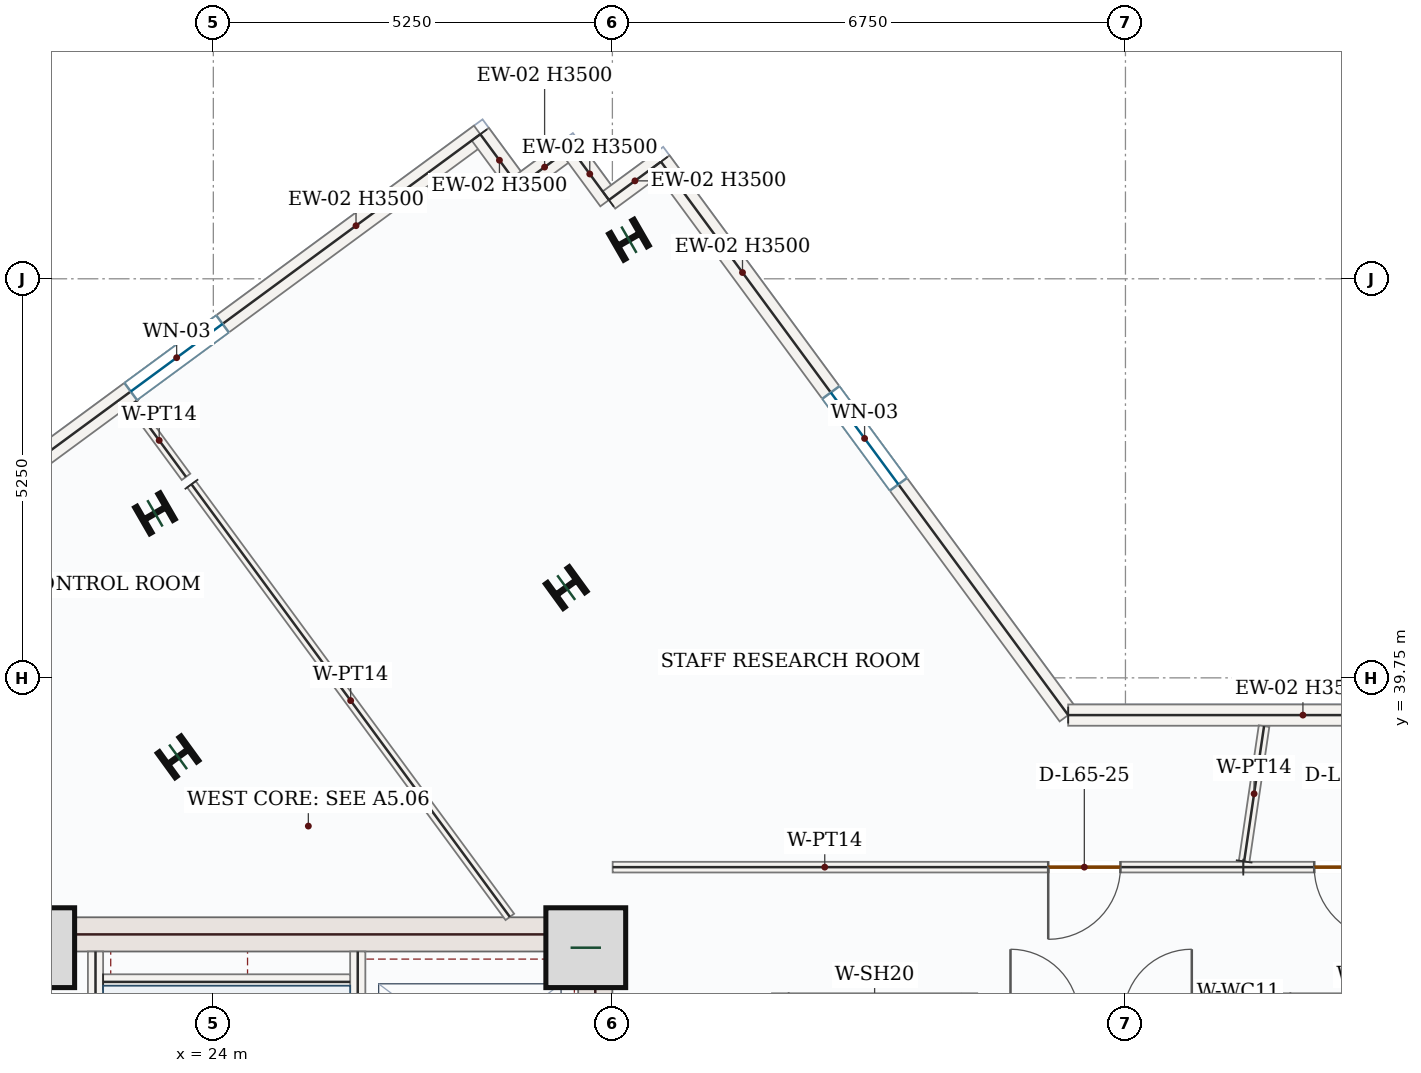
"""IFC4 building model, lengths in metres.
Left out: names, types, materials, properties, quantities, classifications, styles, units other than length and angle.
Written with IfcOpenShell. Run it as: python <this file> out.ifc"""

import sys

from ifc_helpers import new_model, si_unit, direction, frame, frame_2d, origin, origin_2d, place, context, subcontext, project, spatial, rectangle, i_section, extrude, source, transform, mapped, element, fill, save


model = new_model("IFC4")
c1 = context("Model", 3, precision=1e-05, world=origin(), true_north=direction((0.0, 1.0)))
c2 = subcontext(c1, "Body", "Model", "MODEL_VIEW")
j1 = project(units=[si_unit("LENGTHUNIT", "METRE"), si_unit("PLANEANGLEUNIT", "RADIAN")], contexts=[c1])
p1 = place(None, origin())
s1 = spatial("IfcSite", under=j1, at=p1, CompositionType="ELEMENT")
p2 = place(p1, origin())
s2 = spatial("IfcBuilding", under=s1, at=p2, CompositionType="ELEMENT")
p3 = place(p2, frame((0.0, 0.0, 272.85)))
s3 = spatial("IfcBuildingStorey", under=s2, at=p3, CompositionType="ELEMENT", Elevation=272.85)
p4 = place(p3, frame((29.025, 28.05, 0.0), z_axis=(0.0, 0.0, 1.0), x_axis=(0.0, 1.0, 0.0)))
e1 = element("IfcWall", 1, at=p4, inside=s3, PredefinedType="SHEAR", context=c2, shape_type="SweptSolid", body=[
    extrude(rectangle(XDim=8.55, YDim=0.45, at=frame_2d((4.275, 0.0))), origin(), (0.0, 0.0, 1.0), 3.5),
])
p5 = place(p4, frame((1.5, 0.0, 0.0)))
e2 = element("IfcOpeningElement", 2, at=p5, cuts=e1, PredefinedType="OPENING", context=c2, shape_type="SweptSolid", body=[
    extrude(rectangle(XDim=1.1, YDim=2.2, at=frame_2d((0.55, 1.1))), frame((0.0, 0.235, 0.0), z_axis=(0.0, -1.0, 0.0), x_axis=(1.0, 0.0, 0.0)), (0.0, 0.0, 1.0), 0.47),
])
m1 = source(origin(), c2, "Body", "SweptSolid", [
    extrude(rectangle(XDim=7.1, YDim=0.45, at=frame_2d((3.55, 0.0))), origin(), (0.0, 0.0, 1.0), 3.5),
])
p6 = place(p3, frame((21.7, 36.375, 0.0), z_axis=(0.0, 0.0, 1.0), x_axis=(1.0, 0.0, 0.0)))
e3 = element("IfcWall", 3, at=p6, inside=s3, PredefinedType="SHEAR", context=c2, shape_type="MappedRepresentation", body=[
    mapped(m1, transform((0.0, 0.0, 0.0), x_axis=(1.0, 0.0, 0.0), y_axis=(0.0, 1.0, 0.0), z_axis=(0.0, 0.0, 1.0), scale=1.0)),
])
m2 = source(origin(), c2, "Body", "SweptSolid", [
    extrude(rectangle(XDim=1.05, YDim=1.05, at=origin_2d()), origin(), (0.0, 0.0, 1.0), 3.75),
])
for number, where, z_axis, x_axis in (
    (4, (21.65, 36.2, 0.0), (0.0, 0.0, 1.0), (1.0, 0.0, 0.0)),
    (5, (28.9, 36.2, 0.0), (0.0, 0.0, 1.0), (1.0, 0.0, 0.0)),
):
    element("IfcColumn", number, at=place(p3, frame(where, z_axis=z_axis, x_axis=x_axis)), inside=s3, PredefinedType="COLUMN", context=c2, shape_type="MappedRepresentation", body=[
        mapped(m2, transform((0.0, 0.0, 0.0), x_axis=(1.0, 0.0, 0.0), y_axis=(0.0, 1.0, 0.0), z_axis=(0.0, 0.0, 1.0), scale=1.0)),
    ])
m3 = source(origin(), c2, "Body", "SweptSolid", [
    extrude(i_section(OverallWidth=0.399, OverallDepth=0.386, WebThickness=0.021, FlangeThickness=0.033, FilletRadius=0.018, at=origin_2d()), origin(), (0.0, 0.0, 1.0), 3.75),
])
for number, where, z_axis, x_axis in (
    (6, (28.643, 40.937, 0.0), (0.0, 0.0, 1.0), (-0.588, 0.809, 0.0)),
    (7, (23.536, 38.711, 0.0), (0.0, 0.0, 1.0), (-0.588, 0.809, 0.0)),
    (8, (29.468, 45.514, 0.0), (0.0, 0.0, 1.0), (-0.5, 0.866, 0.0)),
    (9, (23.232, 41.914, 0.0), (0.0, 0.0, 1.0), (-0.5, 0.866, 0.0)),
):
    element("IfcColumn", number, at=place(p3, frame(where, z_axis=z_axis, x_axis=x_axis)), inside=s3, PredefinedType="COLUMN", context=c2, shape_type="MappedRepresentation", body=[
        mapped(m3, transform((0.0, 0.0, 0.0), x_axis=(1.0, 0.0, 0.0), y_axis=(0.0, 1.0, 0.0), z_axis=(0.0, 0.0, 1.0), scale=1.0)),
    ])
p7 = place(p3, frame((19.522, 41.022, 0.0), z_axis=(0.0, 0.0, 1.0), x_axis=(0.805418797839, 0.592706132994, 0.0)))
e10 = element("IfcWall", 10, at=p7, inside=s3, PredefinedType="SOLIDWALL", context=c2, shape_type="SweptSolid", body=[
    extrude(rectangle(XDim=9.92, YDim=0.28, at=frame_2d((4.96, 0.0))), origin(), (0.0, 0.0, 1.0), 3.5),
])
p8 = place(p7, frame((4.21, 0.0, 0.85)))
e11 = element("IfcOpeningElement", 11, at=p8, cuts=e10, PredefinedType="OPENING", context=c2, shape_type="SweptSolid", body=[
    extrude(rectangle(XDim=1.5, YDim=1.5, at=frame_2d((0.75, 0.75))), frame((0.0, 0.15, 0.0), z_axis=(0.0, -1.0, 0.0), x_axis=(1.0, 0.0, 0.0)), (0.0, 0.0, 1.0), 0.3),
])
m4 = source(origin(), c2, "Body", "SweptSolid", [
    extrude(rectangle(XDim=0.85, YDim=0.28, at=frame_2d((0.425, 0.0))), origin(), (0.0, 0.0, 1.0), 3.5),
])
for number, where, z_axis, x_axis in (
    (12, (27.512, 46.902, 0.0), (0.0, 0.0, 1.0), (0.593, -0.805, 0.0)),
    (13, (28.016, 46.217, 0.0), (0.0, 0.0, 1.0), (0.805, 0.593, 0.0)),
):
    element("IfcWall", number, at=place(p3, frame(where, z_axis=z_axis, x_axis=x_axis)), inside=s3, PredefinedType="SOLIDWALL", context=c2, shape_type="MappedRepresentation", body=[
        mapped(m4, transform((0.0, 0.0, 0.0), x_axis=(1.0, 0.0, 0.0), y_axis=(0.0, 1.0, 0.0), z_axis=(0.0, 0.0, 1.0), scale=1.0)),
    ])
m5 = source(origin(), c2, "Body", "SweptSolid", [
    extrude(rectangle(XDim=0.85, YDim=0.28, at=frame_2d((0.425, 0.0))), origin(), (0.0, 0.0, 1.0), 3.5),
])
for number, where, z_axis, x_axis in (
    (14, (28.701, 46.721, 0.0), (0.0, 0.0, 1.0), (0.593, -0.805, 0.0)),
    (15, (29.204, 46.037, 0.0), (0.0, 0.0, 1.0), (0.805, 0.593, 0.0)),
):
    element("IfcWall", number, at=place(p3, frame(where, z_axis=z_axis, x_axis=x_axis)), inside=s3, PredefinedType="SOLIDWALL", context=c2, shape_type="MappedRepresentation", body=[
        mapped(m5, transform((0.0, 0.0, 0.0), x_axis=(1.0, 0.0, 0.0), y_axis=(0.0, 1.0, 0.0), z_axis=(0.0, 0.0, 1.0), scale=1.0)),
    ])
p9 = place(p3, frame((29.889, 46.54, 0.0), z_axis=(0.0, 0.0, 1.0), x_axis=(0.592715239748, -0.805412096117, 0.0)))
e16 = element("IfcWall", 16, at=p9, inside=s3, PredefinedType="SOLIDWALL", context=c2, shape_type="SweptSolid", body=[
    extrude(rectangle(XDim=9.039, YDim=0.28, at=frame_2d((4.52, 0.0))), origin(), (0.0, 0.0, 1.0), 3.5),
])
p10 = place(p9, frame((3.77, 0.0, 0.85)))
e17 = element("IfcOpeningElement", 17, at=p10, cuts=e16, PredefinedType="OPENING", context=c2, shape_type="SweptSolid", body=[
    extrude(rectangle(XDim=1.5, YDim=1.5, at=frame_2d((0.75, 0.75))), frame((0.0, 0.15, 0.0), z_axis=(0.0, -1.0, 0.0), x_axis=(1.0, 0.0, 0.0)), (0.0, 0.0, 1.0), 0.3),
])
m6 = source(origin(), c2, "Body", "SweptSolid", [
    extrude(rectangle(XDim=6.177, YDim=0.28, at=frame_2d((3.088, 0.0))), origin(), (0.0, 0.0, 1.0), 3.5),
])
p11 = place(p3, frame((35.247, 39.26, 0.0), z_axis=(0.0, 0.0, 1.0), x_axis=(1.0, 0.0, 0.0)))
e18 = element("IfcWall", 18, at=p11, inside=s3, PredefinedType="SOLIDWALL", context=c2, shape_type="MappedRepresentation", body=[
    mapped(m6, transform((0.0, 0.0, 0.0), x_axis=(1.0, 0.0, 0.0), y_axis=(0.0, 1.0, 0.0), z_axis=(0.0, 0.0, 1.0), scale=1.0)),
])
m7 = source(origin(), c2, "Body", "SweptSolid", [
    extrude(rectangle(XDim=7.87, YDim=0.2, at=frame_2d((3.935, 0.0))), origin(), (0.0, 0.0, 1.0), 3.5),
])
p12 = place(p3, frame((22.45, 28.28, 0.0), z_axis=(0.0, 0.0, 1.0), x_axis=(0.0, 1.0, 0.0)))
e19 = element("IfcWall", 19, at=p12, inside=s3, PredefinedType="SOLIDWALL", context=c2, shape_type="MappedRepresentation", body=[
    mapped(m7, transform((0.0, 0.0, 0.0), x_axis=(1.0, 0.0, 0.0), y_axis=(0.0, 1.0, 0.0), z_axis=(0.0, 0.0, 1.0), scale=1.0)),
])
p13 = place(p3, frame((25.9, 28.15, 0.0), z_axis=(0.0, 0.0, 1.0), x_axis=(0.0, 1.0, 0.0)))
e20 = element("IfcWall", 20, at=p13, inside=s3, PredefinedType="SOLIDWALL", context=c2, shape_type="SweptSolid", body=[
    extrude(rectangle(XDim=8.0, YDim=0.2, at=frame_2d((4.0, 0.0))), origin(), (0.0, 0.0, 1.0), 3.5),
])
p14 = place(p13, frame((0.4, 0.0, 0.0)))
e21 = element("IfcOpeningElement", 21, at=p14, cuts=e20, PredefinedType="OPENING", context=c2, shape_type="SweptSolid", body=[
    extrude(rectangle(XDim=1.05, YDim=2.15, at=frame_2d((0.525, 1.075))), frame((0.0, 0.11, 0.0), z_axis=(0.0, -1.0, 0.0), x_axis=(1.0, 0.0, 0.0)), (0.0, 0.0, 1.0), 0.22),
])
m8 = source(origin(), c2, "Body", "SweptSolid", [
    extrude(rectangle(XDim=3.25, YDim=0.2, at=frame_2d((1.625, 0.0))), origin(), (0.0, 0.0, 1.0), 3.5),
])
p15 = place(p3, frame((22.55, 35.75, 0.0), z_axis=(0.0, 0.0, 1.0), x_axis=(1.0, 0.0, 0.0)))
e22 = element("IfcWall", 22, at=p15, inside=s3, PredefinedType="SOLIDWALL", context=c2, shape_type="MappedRepresentation", body=[
    mapped(m8, transform((0.0, 0.0, 0.0), x_axis=(1.0, 0.0, 0.0), y_axis=(0.0, 1.0, 0.0), z_axis=(0.0, 0.0, 1.0), scale=1.0)),
])
p16 = place(p3, frame((31.45, 33.2, 0.0), z_axis=(0.0, 0.0, 1.0), x_axis=(0.0, 1.0, 0.0)))
e23 = element("IfcWall", 23, at=p16, inside=s3, PredefinedType="SOLIDWALL", context=c2, shape_type="SweptSolid", body=[
    extrude(rectangle(XDim=2.4, YDim=0.2, at=frame_2d((1.2, 0.0))), origin(), (0.0, 0.0, 1.0), 3.5),
])
p17 = place(p16, frame((0.65, 0.0, 0.0)))
e24 = element("IfcOpeningElement", 24, at=p17, cuts=e23, PredefinedType="OPENING", context=c2, shape_type="SweptSolid", body=[
    extrude(rectangle(XDim=1.1, YDim=2.15, at=frame_2d((0.55, 1.075))), frame((0.0, 0.11, 0.0), z_axis=(0.0, -1.0, 0.0), x_axis=(1.0, 0.0, 0.0)), (0.0, 0.0, 1.0), 0.22),
])
m9 = source(origin(), c2, "Body", "SweptSolid", [
    extrude(rectangle(XDim=2.4, YDim=0.2, at=frame_2d((1.2, 0.0))), origin(), (0.0, 0.0, 1.0), 3.5),
])
for number, where, z_axis, x_axis in (
    (25, (33.95, 33.2, 0.0), (0.0, 0.0, 1.0), (0.0, 1.0, 0.0)),
    (26, (38.05, 33.2, 0.0), (0.0, 0.0, 1.0), (0.0, 1.0, 0.0)),
):
    element("IfcWall", number, at=place(p3, frame(where, z_axis=z_axis, x_axis=x_axis)), inside=s3, PredefinedType="SOLIDWALL", context=c2, shape_type="MappedRepresentation", body=[
        mapped(m9, transform((0.0, 0.0, 0.0), x_axis=(1.0, 0.0, 0.0), y_axis=(0.0, 1.0, 0.0), z_axis=(0.0, 0.0, 1.0), scale=1.0)),
    ])
m10 = source(origin(), c2, "Body", "SweptSolid", [
    extrude(rectangle(XDim=1.191, YDim=0.14, at=frame_2d((0.595, 0.0))), origin(), (0.0, 0.0, 1.0), 3.5),
])
p18 = place(p3, frame((22.935, 43.353, 0.0), z_axis=(0.0, 0.0, 1.0), x_axis=(0.592625306686, -0.80547827151, 0.0)))
e27 = element("IfcWall", 27, at=p18, inside=s3, PredefinedType="PARTITIONING", context=c2, shape_type="MappedRepresentation", body=[
    mapped(m10, transform((0.0, 0.0, 0.0), x_axis=(1.0, 0.0, 0.0), y_axis=(0.0, 1.0, 0.0), z_axis=(0.0, 0.0, 1.0), scale=1.0)),
])
m11 = source(origin(), c2, "Body", "SweptSolid", [
    extrude(rectangle(XDim=7.067, YDim=0.14, at=frame_2d((3.533, 0.0))), origin(), (0.0, 0.0, 1.0), 3.5),
])
p19 = place(p3, frame((23.712, 42.297, 0.0), z_axis=(0.0, 0.0, 1.0), x_axis=(0.592689830588, -0.805430794493, 0.0)))
e28 = element("IfcWall", 28, at=p19, inside=s3, PredefinedType="PARTITIONING", context=c2, shape_type="MappedRepresentation", body=[
    mapped(m11, transform((0.0, 0.0, 0.0), x_axis=(1.0, 0.0, 0.0), y_axis=(0.0, 1.0, 0.0), z_axis=(0.0, 0.0, 1.0), scale=1.0)),
])
p20 = place(p3, frame((42.742, 37.26, 0.0), z_axis=(0.0, 0.0, 1.0), x_axis=(-0.999999998895, 4.7021207e-05, 0.0)))
e29 = element("IfcWall", 29, at=p20, inside=s3, PredefinedType="PARTITIONING", context=c2, shape_type="SweptSolid", body=[
    extrude(rectangle(XDim=5.192, YDim=0.14, at=frame_2d((2.596, 0.0))), origin(), (0.0, 0.0, 1.0), 3.5),
])
p21 = place(p20, frame((3.309, 0.0, 0.0)))
e30 = element("IfcOpeningElement", 30, at=p21, cuts=e29, PredefinedType="OPENING", context=c2, shape_type="SweptSolid", body=[
    extrude(rectangle(XDim=0.95, YDim=2.15, at=frame_2d((0.475, 1.075))), frame((0.0, 0.08, 0.0), z_axis=(0.0, -1.0, 0.0), x_axis=(1.0, 0.0, 0.0)), (0.0, 0.0, 1.0), 0.16),
])
m12 = source(origin(), c2, "Body", "SweptSolid", [
    extrude(rectangle(XDim=1.799, YDim=0.14, at=frame_2d((0.9, 0.0))), origin(), (0.0, 0.0, 1.0), 3.5),
])
p22 = place(p3, frame((37.561, 37.335, 0.0), z_axis=(0.0, 0.0, 1.0), x_axis=(0.14573227875, 0.989324063657, 0.0)))
e31 = element("IfcWall", 31, at=p22, inside=s3, PredefinedType="PARTITIONING", context=c2, shape_type="MappedRepresentation", body=[
    mapped(m12, transform((0.0, 0.0, 0.0), x_axis=(1.0, 0.0, 0.0), y_axis=(0.0, 1.0, 0.0), z_axis=(0.0, 0.0, 1.0), scale=1.0)),
])
p23 = place(p3, frame((37.55, 37.26, 0.0), z_axis=(0.0, 0.0, 1.0), x_axis=(-0.999999998268, -5.8852956e-05, 0.0)))
e32 = element("IfcWall", 32, at=p23, inside=s3, PredefinedType="PARTITIONING", context=c2, shape_type="SweptSolid", body=[
    extrude(rectangle(XDim=8.297, YDim=0.14, at=frame_2d((4.148, 0.0))), origin(), (0.0, 0.0, 1.0), 3.5),
])
p24 = place(p23, frame((1.616, 0.0, 0.0)))
e33 = element("IfcOpeningElement", 33, at=p24, cuts=e32, PredefinedType="OPENING", context=c2, shape_type="SweptSolid", body=[
    extrude(rectangle(XDim=0.95, YDim=2.15, at=frame_2d((0.475, 1.075))), frame((0.0, 0.08, 0.0), z_axis=(0.0, -1.0, 0.0), x_axis=(1.0, 0.0, 0.0)), (0.0, 0.0, 1.0), 0.16),
])
m13 = source(origin(), c2, "Body", "SweptSolid", [
    extrude(rectangle(XDim=1.5, YDim=1.5, at=frame_2d((0.75, 0.75))), frame((0.0, 0.03, 0.0), z_axis=(0.0, -1.0, 0.0), x_axis=(1.0, 0.0, 0.0)), (0.0, 0.0, 1.0), 0.06),
])
p25 = place(p8, origin())
e34 = element("IfcWindow", 34, at=p25, inside=s3, PartitioningType="SINGLE_PANEL", PredefinedType="WINDOW", context=c2, shape_type="MappedRepresentation", body=[
    mapped(m13, transform((0.0, 0.0, 0.0), x_axis=(1.0, 0.0, 0.0), y_axis=(0.0, 1.0, 0.0), z_axis=(0.0, 0.0, 1.0), scale=1.0)),
])
fill(e11, e34)
p26 = place(p10, origin())
e35 = element("IfcWindow", 35, at=p26, inside=s3, PartitioningType="SINGLE_PANEL", PredefinedType="WINDOW", context=c2, shape_type="MappedRepresentation", body=[
    mapped(m13, transform((0.0, 0.0, 0.0), x_axis=(1.0, 0.0, 0.0), y_axis=(0.0, 1.0, 0.0), z_axis=(0.0, 0.0, 1.0), scale=1.0)),
])
fill(e17, e35)
m14 = source(origin(), c2, "Body", "SweptSolid", [
    extrude(rectangle(XDim=0.95, YDim=2.15, at=frame_2d((0.475, 1.075))), frame((0.0, 0.025, 0.0), z_axis=(0.0, -1.0, 0.0), x_axis=(1.0, 0.0, 0.0)), (0.0, 0.0, 1.0), 0.05),
])
p27 = place(p21, origin())
e36 = element("IfcDoor", 36, at=p27, inside=s3, OperationType="SINGLE_SWING_LEFT", PredefinedType="DOOR", context=c2, shape_type="MappedRepresentation", body=[
    mapped(m14, transform((0.0, 0.0, 0.0), x_axis=(1.0, 0.0, 0.0), y_axis=(0.0, 1.0, 0.0), z_axis=(0.0, 0.0, 1.0), scale=1.0)),
])
fill(e30, e36)
p28 = place(p24, origin())
e37 = element("IfcDoor", 37, at=p28, inside=s3, OperationType="SINGLE_SWING_RIGHT", PredefinedType="DOOR", context=c2, shape_type="MappedRepresentation", body=[
    mapped(m14, transform((0.0, 0.0, 0.0), x_axis=(1.0, 0.0, 0.0), y_axis=(0.0, 1.0, 0.0), z_axis=(0.0, 0.0, 1.0), scale=1.0)),
])
fill(e33, e37)
save(model, sys.argv[1])
